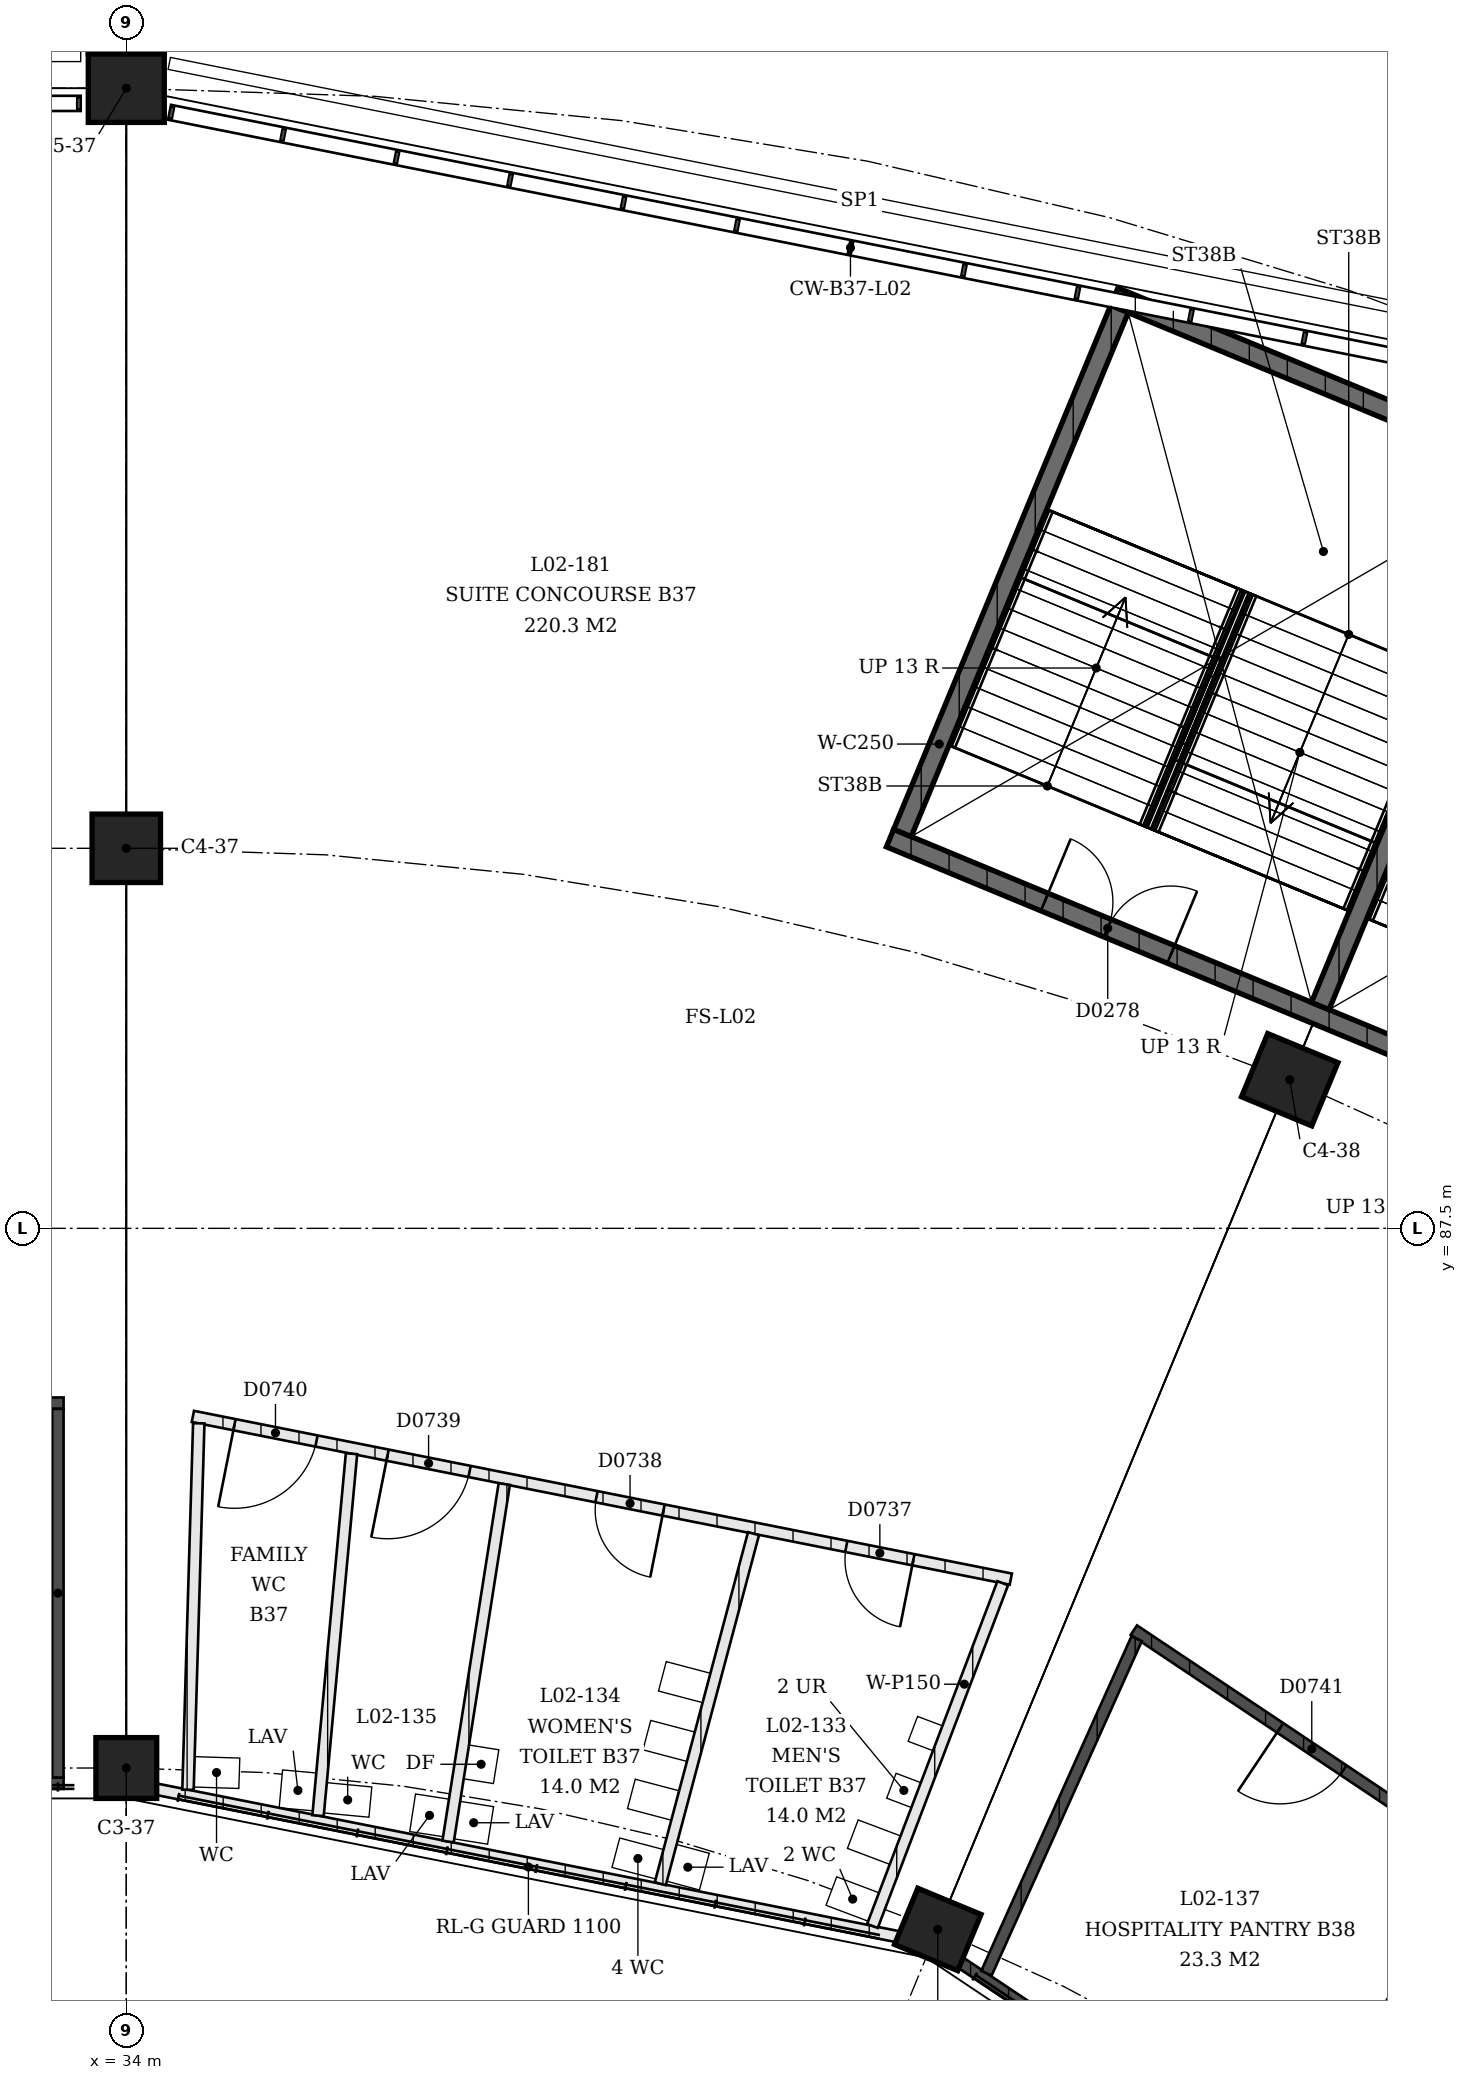
"""IFC4 building model, lengths in metres.
Left out: names, types, materials, properties, quantities, classifications, styles, units other than length and angle.
Written with IfcOpenShell. Run it as: python <this file> out.ifc"""

import sys

from ifc_helpers import new_model, si_unit, direction, frame, frame_2d, origin, origin_2d, place, context, subcontext, project, spatial, rectangle, extrude, element, fill, save


model = new_model("IFC4")
c1 = context("Model", 3, precision=1e-05, world=origin(), true_north=direction((0.0, 1.0)))
c2 = subcontext(c1, "Body", "Model", "MODEL_VIEW")
j1 = project(units=[si_unit("LENGTHUNIT", "METRE"), si_unit("PLANEANGLEUNIT", "RADIAN")], contexts=[c1])
p1 = place(None, origin())
s1 = spatial("IfcSite", under=j1, at=p1, CompositionType="ELEMENT")
p2 = place(p1, origin())
s2 = spatial("IfcBuilding", under=s1, at=p2, CompositionType="ELEMENT")
p3 = place(p2, frame((0.0, 0.0, 9.0)))
s3 = spatial("IfcBuildingStorey", under=s2, at=p3, CompositionType="ELEMENT", Elevation=9.0)
p4 = place(p3, frame((34.0, 80.4, 0.0), z_axis=(0.0, 0.0, 1.0), x_axis=(-1.0, 0.0, 0.0)))
e1 = element("IfcColumn", 1, at=p4, inside=s3, PredefinedType="COLUMN", context=c2, shape_type="SweptSolid", body=[
    extrude(rectangle(XDim=0.8, YDim=0.8, at=origin_2d()), origin(), (0.0, 0.0, 1.0), 4.5),
])
p5 = place(p3, frame((34.0, 92.5, 0.0), z_axis=(0.0, 0.0, 1.0), x_axis=(-1.0, 0.0, 0.0)))
e2 = element("IfcColumn", 2, at=p5, inside=s3, PredefinedType="COLUMN", context=c2, shape_type="SweptSolid", body=[
    extrude(rectangle(XDim=0.9, YDim=0.9, at=origin_2d()), origin(), (0.0, 0.0, 1.0), 4.5),
])
p6 = place(p3, frame((34.0, 102.5, 0.0), z_axis=(0.0, 0.0, 1.0), x_axis=(-1.0, 0.0, 0.0)))
e3 = element("IfcColumn", 3, at=p6, inside=s3, PredefinedType="COLUMN", context=c2, shape_type="SweptSolid", body=[
    extrude(rectangle(XDim=1.0, YDim=0.9, at=origin_2d()), origin(), (0.0, 0.0, 1.0), 4.5),
])
p7 = place(p3, frame((44.677, 78.276, 0.0), z_axis=(0.0, 0.0, 1.0), x_axis=(-0.923879532511, 0.382683432365, 0.0)))
e4 = element("IfcColumn", 4, at=p7, inside=s3, PredefinedType="COLUMN", context=c2, shape_type="SweptSolid", body=[
    extrude(rectangle(XDim=0.9, YDim=0.8, at=origin_2d()), origin(), (0.0, 0.0, 1.0), 4.5),
])
p8 = place(p3, frame((49.307, 89.455, 0.0), z_axis=(0.0, 0.0, 1.0), x_axis=(-0.923879532511, 0.382683432365, 0.0)))
e5 = element("IfcColumn", 5, at=p8, inside=s3, PredefinedType="COLUMN", context=c2, shape_type="SweptSolid", body=[
    extrude(rectangle(XDim=1.0, YDim=0.9, at=origin_2d()), origin(), (0.0, 0.0, 1.0), 4.5),
])
p9 = place(p3, frame((55.274, 87.985, 0.0), z_axis=(0.0, 0.0, 1.0), x_axis=(-0.923877480578, 0.382688386133, 0.0)))
e6 = element("IfcWall", 6, at=p9, inside=s3, PredefinedType="SHEAR", context=c2, shape_type="SweptSolid", body=[
    extrude(rectangle(XDim=12.15, YDim=0.25, at=frame_2d((6.075, 0.0))), origin(), (0.0, 0.0, 1.0), 4.09),
])
p10 = place(p9, frame((2.2, 0.0, 0.0)))
e7 = element("IfcOpeningElement", 7, at=p10, cuts=e6, PredefinedType="OPENING", context=c2, shape_type="SweptSolid", body=[
    extrude(rectangle(XDim=1.8, YDim=2.1, at=frame_2d((0.9, 1.05))), frame((0.0, 0.125, 0.0), z_axis=(0.0, -1.0, 0.0), x_axis=(1.0, 0.0, 0.0)), (0.0, 0.0, 1.0), 0.25),
])
p11 = place(p9, frame((8.15, 0.0, 0.0)))
e8 = element("IfcOpeningElement", 8, at=p11, cuts=e6, PredefinedType="OPENING", context=c2, shape_type="SweptSolid", body=[
    extrude(rectangle(XDim=1.8, YDim=2.1, at=frame_2d((0.9, 1.05))), frame((0.0, 0.125, 0.0), z_axis=(0.0, -1.0, 0.0), x_axis=(1.0, 0.0, 0.0)), (0.0, 0.0, 1.0), 0.25),
])
p12 = place(p3, frame((58.224, 95.108, 0.0), z_axis=(0.0, 0.0, 1.0), x_axis=(-0.923884584817, 0.382671234792, 0.0)))
e9 = element("IfcWall", 9, at=p12, inside=s3, PredefinedType="SHEAR", context=c2, shape_type="SweptSolid", body=[
    extrude(rectangle(XDim=12.15, YDim=0.25, at=frame_2d((6.075, 0.0))), origin(), (0.0, 0.0, 1.0), 4.09),
])
p13 = place(p3, frame((44.212, 92.702, 0.0), z_axis=(0.0, 0.0, 1.0), x_axis=(0.382664910245, 0.923887204407, 0.0)))
e10 = element("IfcWall", 10, at=p13, inside=s3, PredefinedType="SHEAR", context=c2, shape_type="SweptSolid", body=[
    extrude(rectangle(XDim=7.46, YDim=0.25, at=frame_2d((3.73, 0.0))), origin(), (0.0, 0.0, 1.0), 4.09),
])
p14 = place(p3, frame((49.709, 90.425, 0.0), z_axis=(0.0, 0.0, 1.0), x_axis=(0.382676480483, 0.923882412044, 0.0)))
e11 = element("IfcWall", 11, at=p14, inside=s3, PredefinedType="SHEAR", context=c2, shape_type="SweptSolid", body=[
    extrude(rectangle(XDim=7.46, YDim=0.25, at=frame_2d((3.73, 0.0))), origin(), (0.0, 0.0, 1.0), 4.09),
])
p15 = place(p3, frame((20.9, 80.2, 0.0), z_axis=(0.0, 0.0, 1.0), x_axis=(1.0, 0.0, 0.0)))
e12 = element("IfcWall", 12, at=p15, inside=s3, PredefinedType="SOLIDWALL", context=c2, shape_type="SweptSolid", body=[
    extrude(rectangle(XDim=12.275, YDim=0.15, at=frame_2d((6.138, 0.0))), origin(), (0.0, 0.0, 1.0), 3.0),
])
p16 = place(p3, frame((21.225, 85.2, 0.0), z_axis=(0.0, 0.0, 1.0), x_axis=(1.0, 0.0, 0.0)))
e13 = element("IfcWall", 13, at=p16, inside=s3, PredefinedType="SOLIDWALL", context=c2, shape_type="SweptSolid", body=[
    extrude(rectangle(XDim=11.95, YDim=0.15, at=frame_2d((5.975, 0.0))), origin(), (0.0, 0.0, 1.0), 3.0),
])
p17 = place(p16, frame((2.525, 0.0, 0.0)))
e14 = element("IfcOpeningElement", 14, at=p17, cuts=e13, PredefinedType="OPENING", context=c2, shape_type="SweptSolid", body=[
    extrude(rectangle(XDim=1.0, YDim=2.1, at=frame_2d((0.5, 1.05))), frame((0.0, 0.075, 0.0), z_axis=(0.0, -1.0, 0.0), x_axis=(1.0, 0.0, 0.0)), (0.0, 0.0, 1.0), 0.15),
])
p18 = place(p16, frame((8.425, 0.0, 0.0)))
e15 = element("IfcOpeningElement", 15, at=p18, cuts=e13, PredefinedType="OPENING", context=c2, shape_type="SweptSolid", body=[
    extrude(rectangle(XDim=1.0, YDim=2.1, at=frame_2d((0.5, 1.05))), frame((0.0, 0.075, 0.0), z_axis=(0.0, -1.0, 0.0), x_axis=(1.0, 0.0, 0.0)), (0.0, 0.0, 1.0), 0.15),
])
p19 = place(p3, frame((33.1, 80.275, 0.0), z_axis=(0.0, 0.0, 1.0), x_axis=(0.0, 1.0, 0.0)))
e16 = element("IfcWall", 16, at=p19, inside=s3, PredefinedType="SOLIDWALL", context=c2, shape_type="SweptSolid", body=[
    extrude(rectangle(XDim=4.85, YDim=0.15, at=frame_2d((2.425, 0.0))), origin(), (0.0, 0.0, 1.0), 3.0),
])
p20 = place(p3, frame((44.15, 78.181, 0.0), z_axis=(0.0, 0.0, 1.0), x_axis=(-0.980786042223, 0.195086492048, 0.0)))
e17 = element("IfcWall", 17, at=p20, inside=s3, PredefinedType="PARTITIONING", context=c2, shape_type="SweptSolid", body=[
    extrude(rectangle(XDim=9.941, YDim=0.15, at=frame_2d((4.971, 0.0))), origin(), (0.0, 0.0, 1.0), 3.0),
])
p21 = place(p3, frame((45.638, 82.885, 0.0), z_axis=(0.0, 0.0, 1.0), x_axis=(-0.980788934186, 0.195071952313, 0.0)))
e18 = element("IfcWall", 18, at=p21, inside=s3, PredefinedType="PARTITIONING", context=c2, shape_type="SweptSolid", body=[
    extrude(rectangle(XDim=10.972, YDim=0.15, at=frame_2d((5.486, 0.0))), origin(), (0.0, 0.0, 1.0), 3.0),
])
p22 = place(p21, frame((1.307, 0.0, 0.0)))
e19 = element("IfcOpeningElement", 19, at=p22, cuts=e18, PredefinedType="OPENING", context=c2, shape_type="SweptSolid", body=[
    extrude(rectangle(XDim=0.9, YDim=2.1, at=frame_2d((0.45, 1.05))), frame((0.0, 0.075, 0.0), z_axis=(0.0, -1.0, 0.0), x_axis=(1.0, 0.0, 0.0)), (0.0, 0.0, 1.0), 0.15),
])
p23 = place(p21, frame((4.658, 0.0, 0.0)))
e20 = element("IfcOpeningElement", 20, at=p23, cuts=e18, PredefinedType="OPENING", context=c2, shape_type="SweptSolid", body=[
    extrude(rectangle(XDim=0.9, YDim=2.1, at=frame_2d((0.45, 1.05))), frame((0.0, 0.075, 0.0), z_axis=(0.0, -1.0, 0.0), x_axis=(1.0, 0.0, 0.0)), (0.0, 0.0, 1.0), 0.15),
])
p24 = place(p21, frame((7.26, 0.0, 0.0)))
e21 = element("IfcOpeningElement", 21, at=p24, cuts=e18, PredefinedType="OPENING", context=c2, shape_type="SweptSolid", body=[
    extrude(rectangle(XDim=1.1, YDim=2.1, at=frame_2d((0.55, 1.05))), frame((0.0, 0.075, 0.0), z_axis=(0.0, -1.0, 0.0), x_axis=(1.0, 0.0, 0.0)), (0.0, 0.0, 1.0), 0.15),
])
p25 = place(p21, frame((9.314, 0.0, 0.0)))
e22 = element("IfcOpeningElement", 22, at=p25, cuts=e18, PredefinedType="OPENING", context=c2, shape_type="SweptSolid", body=[
    extrude(rectangle(XDim=1.1, YDim=2.1, at=frame_2d((0.55, 1.05))), frame((0.0, 0.075, 0.0), z_axis=(0.0, -1.0, 0.0), x_axis=(1.0, 0.0, 0.0)), (0.0, 0.0, 1.0), 0.15),
])
p26 = place(p3, frame((43.817, 78.322, 0.0), z_axis=(0.0, 0.0, 1.0), x_axis=(0.35538492255, 0.934720041951, 0.0)))
e23 = element("IfcWall", 23, at=p26, inside=s3, PredefinedType="PARTITIONING", context=c2, shape_type="SweptSolid", body=[
    extrude(rectangle(XDim=4.824, YDim=0.15, at=frame_2d((2.412, 0.0))), origin(), (0.0, 0.0, 1.0), 3.0),
])
p27 = place(p3, frame((41.026, 78.877, 0.0), z_axis=(0.0, 0.0, 1.0), x_axis=(0.257378912157, 0.966310558556, 0.0)))
e24 = element("IfcWall", 24, at=p27, inside=s3, PredefinedType="PARTITIONING", context=c2, shape_type="SweptSolid", body=[
    extrude(rectangle(XDim=4.767, YDim=0.15, at=frame_2d((2.383, 0.0))), origin(), (0.0, 0.0, 1.0), 3.0),
])
p28 = place(p3, frame((38.234, 79.433, 0.0), z_axis=(0.0, 0.0, 1.0), x_axis=(0.155285736325, 0.987869596705, 0.0)))
e25 = element("IfcWall", 25, at=p28, inside=s3, PredefinedType="PARTITIONING", context=c2, shape_type="SweptSolid", body=[
    extrude(rectangle(XDim=4.761, YDim=0.15, at=frame_2d((2.38, 0.0))), origin(), (0.0, 0.0, 1.0), 3.0),
])
p29 = place(p3, frame((36.523, 79.773, 0.0), z_axis=(0.0, 0.0, 1.0), x_axis=(0.09208667632, 0.995750995, 0.0)))
e26 = element("IfcWall", 26, at=p29, inside=s3, PredefinedType="PARTITIONING", context=c2, shape_type="SweptSolid", body=[
    extrude(rectangle(XDim=4.783, YDim=0.15, at=frame_2d((2.391, 0.0))), origin(), (0.0, 0.0, 1.0), 3.0),
])
p30 = place(p3, frame((34.812, 80.114, 0.0), z_axis=(0.0, 0.0, 1.0), x_axis=(0.029405000692, 0.999567579473, 0.0)))
e27 = element("IfcWall", 27, at=p30, inside=s3, PredefinedType="PARTITIONING", context=c2, shape_type="SweptSolid", body=[
    extrude(rectangle(XDim=4.824, YDim=0.15, at=frame_2d((2.412, 0.0))), origin(), (0.0, 0.0, 1.0), 3.0),
])
p31 = place(p3, frame((44.982, 77.837, 0.0), z_axis=(0.0, 0.0, 1.0), x_axis=(0.831461186136, -0.555582843463, 0.0)))
e28 = element("IfcWall", 28, at=p31, inside=s3, PredefinedType="SOLIDWALL", context=c2, shape_type="SweptSolid", body=[
    extrude(rectangle(XDim=9.89, YDim=0.15, at=frame_2d((4.945, 0.0))), origin(), (0.0, 0.0, 1.0), 3.0),
])
p32 = place(p3, frame((47.257, 82.215, 0.0), z_axis=(0.0, 0.0, 1.0), x_axis=(0.831471162003, -0.555567913722, 0.0)))
e29 = element("IfcWall", 29, at=p32, inside=s3, PredefinedType="SOLIDWALL", context=c2, shape_type="SweptSolid", body=[
    extrude(rectangle(XDim=11.099, YDim=0.15, at=frame_2d((5.55, 0.0))), origin(), (0.0, 0.0, 1.0), 3.0),
])
p33 = place(p32, frame((2.315, 0.0, 0.0)))
e30 = element("IfcOpeningElement", 30, at=p33, cuts=e29, PredefinedType="OPENING", context=c2, shape_type="SweptSolid", body=[
    extrude(rectangle(XDim=1.0, YDim=2.1, at=frame_2d((0.5, 1.05))), frame((0.0, 0.075, 0.0), z_axis=(0.0, -1.0, 0.0), x_axis=(1.0, 0.0, 0.0)), (0.0, 0.0, 1.0), 0.15),
])
p34 = place(p32, frame((7.784, 0.0, 0.0)))
e31 = element("IfcOpeningElement", 31, at=p34, cuts=e29, PredefinedType="OPENING", context=c2, shape_type="SweptSolid", body=[
    extrude(rectangle(XDim=1.0, YDim=2.1, at=frame_2d((0.5, 1.05))), frame((0.0, 0.075, 0.0), z_axis=(0.0, -1.0, 0.0), x_axis=(1.0, 0.0, 0.0)), (0.0, 0.0, 1.0), 0.15),
])
p35 = place(p3, frame((45.317, 77.701, 0.0), z_axis=(0.0, 0.0, 1.0), x_axis=(0.409657452305, 0.912239426779, 0.0)))
e32 = element("IfcWall", 32, at=p35, inside=s3, PredefinedType="SOLIDWALL", context=c2, shape_type="SweptSolid", body=[
    extrude(rectangle(XDim=4.824, YDim=0.15, at=frame_2d((2.412, 0.0))), origin(), (0.0, 0.0, 1.0), 3.0),
])
p36 = place(p3, frame((49.179, 75.12, 0.0), z_axis=(0.0, 0.0, 1.0), x_axis=(0.557220399255, 0.830364634756, 0.0)))
e33 = element("IfcWall", 33, at=p36, inside=s3, PredefinedType="SOLIDWALL", context=c2, shape_type="SweptSolid", body=[
    extrude(rectangle(XDim=4.757, YDim=0.15, at=frame_2d((2.378, 0.0))), origin(), (0.0, 0.0, 1.0), 3.0),
])
p37 = place(p11, origin())
e34 = element("IfcDoor", 34, at=p37, inside=s3, OperationType="DOUBLE_DOOR_SINGLE_SWING", PredefinedType="DOOR", context=c2, shape_type="SweptSolid", body=[
    extrude(rectangle(XDim=1.8, YDim=2.1, at=frame_2d((0.9, 1.05))), frame((0.0, 0.025, 0.0), z_axis=(0.0, -1.0, 0.0), x_axis=(1.0, 0.0, 0.0)), (0.0, 0.0, 1.0), 0.05),
])
fill(e8, e34)
p38 = place(p22, origin())
e35 = element("IfcDoor", 35, at=p38, inside=s3, OperationType="SINGLE_SWING_RIGHT", PredefinedType="DOOR", context=c2, shape_type="SweptSolid", body=[
    extrude(rectangle(XDim=0.9, YDim=2.1, at=frame_2d((0.45, 1.05))), frame((0.0, 0.025, 0.0), z_axis=(0.0, -1.0, 0.0), x_axis=(1.0, 0.0, 0.0)), (0.0, 0.0, 1.0), 0.05),
])
fill(e19, e35)
p39 = place(p23, origin())
e36 = element("IfcDoor", 36, at=p39, inside=s3, OperationType="SINGLE_SWING_RIGHT", PredefinedType="DOOR", context=c2, shape_type="SweptSolid", body=[
    extrude(rectangle(XDim=0.9, YDim=2.1, at=frame_2d((0.45, 1.05))), frame((0.0, 0.025, 0.0), z_axis=(0.0, -1.0, 0.0), x_axis=(1.0, 0.0, 0.0)), (0.0, 0.0, 1.0), 0.05),
])
fill(e20, e36)
p40 = place(p24, origin())
e37 = element("IfcDoor", 37, at=p40, inside=s3, OperationType="SINGLE_SWING_LEFT", PredefinedType="DOOR", context=c2, shape_type="SweptSolid", body=[
    extrude(rectangle(XDim=1.1, YDim=2.1, at=frame_2d((0.55, 1.05))), frame((0.0, 0.025, 0.0), z_axis=(0.0, -1.0, 0.0), x_axis=(1.0, 0.0, 0.0)), (0.0, 0.0, 1.0), 0.05),
])
fill(e21, e37)
p41 = place(p25, origin())
e38 = element("IfcDoor", 38, at=p41, inside=s3, OperationType="SINGLE_SWING_LEFT", PredefinedType="DOOR", context=c2, shape_type="SweptSolid", body=[
    extrude(rectangle(XDim=1.1, YDim=2.1, at=frame_2d((0.55, 1.05))), frame((0.0, 0.025, 0.0), z_axis=(0.0, -1.0, 0.0), x_axis=(1.0, 0.0, 0.0)), (0.0, 0.0, 1.0), 0.05),
])
fill(e22, e38)
p42 = place(p33, origin())
e39 = element("IfcDoor", 39, at=p42, inside=s3, OperationType="SINGLE_SWING_LEFT", PredefinedType="DOOR", context=c2, shape_type="SweptSolid", body=[
    extrude(rectangle(XDim=1.0, YDim=2.1, at=frame_2d((0.5, 1.05))), frame((0.0, 0.025, 0.0), z_axis=(0.0, -1.0, 0.0), x_axis=(1.0, 0.0, 0.0)), (0.0, 0.0, 1.0), 0.05),
])
fill(e30, e39)
save(model, sys.argv[1])
